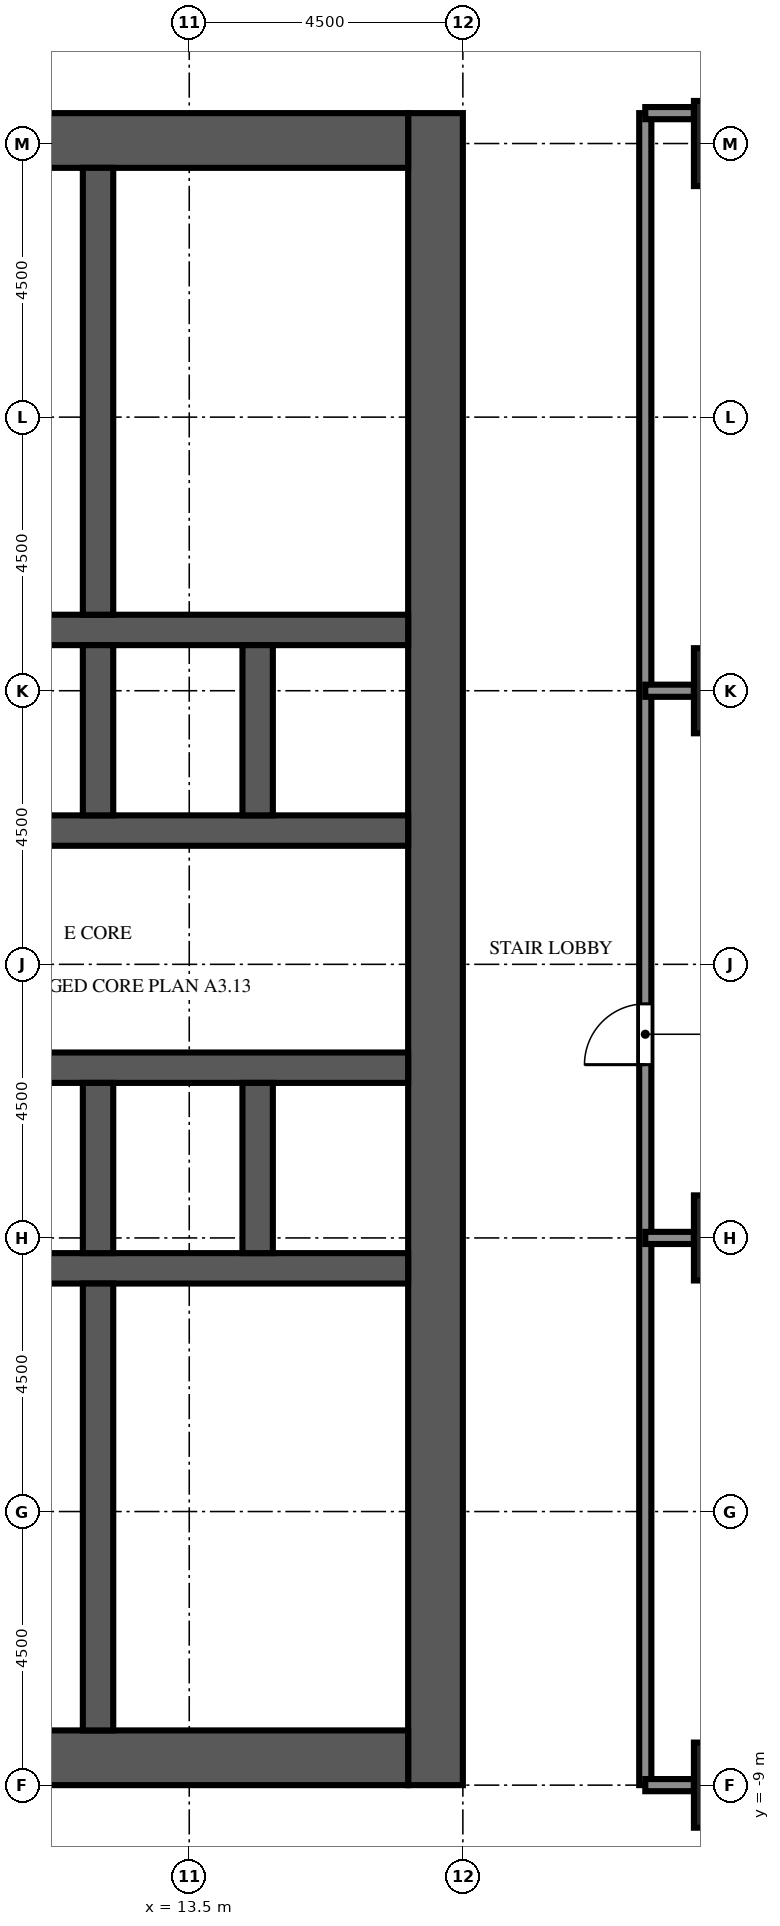
"""IFC4 building model, lengths in metres.
Left out: names, types, materials, properties, quantities, classifications, styles, units other than length and angle.
Written with IfcOpenShell. Run it as: python <this file> out.ifc"""

import sys

from ifc_helpers import new_model, si_unit, direction, frame, frame_2d, origin, origin_2d, place, context, subcontext, project, spatial, rectangle, extrude, element, fill, save


model = new_model("IFC4")
c1 = context("Model", 3, precision=1e-05, world=origin(), true_north=direction((0.0, 1.0)))
c2 = subcontext(c1, "Body", "Model", "MODEL_VIEW")
j1 = project(units=[si_unit("LENGTHUNIT", "METRE"), si_unit("PLANEANGLEUNIT", "RADIAN")], contexts=[c1])
p1 = place(None, origin())
s1 = spatial("IfcSite", under=j1, at=p1, CompositionType="ELEMENT")
p2 = place(p1, origin())
s2 = spatial("IfcBuilding", under=s1, at=p2, CompositionType="ELEMENT")
p3 = place(p2, frame((0.0, 0.0, 76.6)))
s3 = spatial("IfcBuildingStorey", under=s2, at=p3, CompositionType="ELEMENT", Elevation=76.6)
for number, where, z_axis, x_axis in (
    (1, (22.5, -9.0, 0.0), (0.0, 0.0, 1.0), (1.0, 0.0, 0.0)),
    (2, (22.5, 0.0, 0.0), (0.0, 0.0, 1.0), (1.0, 0.0, 0.0)),
    (3, (22.5, 9.0, 0.0), (0.0, 0.0, 1.0), (1.0, 0.0, 0.0)),
    (4, (22.5, 18.0, 0.0), (0.0, 0.0, 1.0), (1.0, 0.0, 0.0)),
):
    element("IfcColumn", number, at=place(p3, frame(where, z_axis=z_axis, x_axis=x_axis)), inside=s3, PredefinedType="COLUMN", context=c2, shape_type="SweptSolid", body=[
        extrude(rectangle(XDim=1.4, YDim=1.4, at=origin_2d()), origin(), (0.0, 0.0, 1.0), 5.4),
    ])
p4 = place(p3, frame((17.55, -9.0, 0.0), z_axis=(0.0, 0.0, 1.0), x_axis=(0.0, 1.0, 0.0)))
e5 = element("IfcWall", 5, at=p4, inside=s3, PredefinedType="SHEAR", context=c2, shape_type="SweptSolid", body=[
    extrude(rectangle(XDim=27.5, YDim=0.9, at=frame_2d((13.75, 0.0))), origin(), (0.0, 0.0, 1.0), 5.4),
])
p5 = place(p4, frame((12.55, 0.0, 0.0)))
e6 = element("IfcOpeningElement", 6, at=p5, cuts=e5, PredefinedType="OPENING", context=c2, shape_type="SweptSolid", body=[
    extrude(rectangle(XDim=2.4, YDim=2.4, at=frame_2d((1.2, 1.2))), frame((0.0, 0.46, 0.0), z_axis=(0.0, -1.0, 0.0), x_axis=(1.0, 0.0, 0.0)), (0.0, 0.0, 1.0), 0.92),
])
p6 = place(p4, frame((6.825, 0.0, 0.0)))
e7 = element("IfcOpeningElement", 7, at=p6, cuts=e5, PredefinedType="OPENING", context=c2, shape_type="SweptSolid", body=[
    extrude(rectangle(XDim=1.2, YDim=2.1, at=frame_2d((0.6, 1.05))), frame((0.0, 0.46, 0.0), z_axis=(0.0, -1.0, 0.0), x_axis=(1.0, 0.0, 0.0)), (0.0, 0.0, 1.0), 0.92),
])
p7 = place(p4, frame((19.475, 0.0, 0.0)))
e8 = element("IfcOpeningElement", 8, at=p7, cuts=e5, PredefinedType="OPENING", context=c2, shape_type="SweptSolid", body=[
    extrude(rectangle(XDim=1.2, YDim=2.1, at=frame_2d((0.6, 1.05))), frame((0.0, 0.46, 0.0), z_axis=(0.0, -1.0, 0.0), x_axis=(1.0, 0.0, 0.0)), (0.0, 0.0, 1.0), 0.92),
])
for number, where, z_axis, x_axis in (
    (9, (6.9, -8.55, 0.0), (0.0, 0.0, 1.0), (1.0, 0.0, 0.0)),
    (10, (6.9, 18.05, 0.0), (0.0, 0.0, 1.0), (1.0, 0.0, 0.0)),
):
    element("IfcWall", number, at=place(p3, frame(where, z_axis=z_axis, x_axis=x_axis)), inside=s3, PredefinedType="SHEAR", context=c2, shape_type="SweptSolid", body=[
        extrude(rectangle(XDim=10.2, YDim=0.9, at=frame_2d((5.1, 0.0))), origin(), (0.0, 0.0, 1.0), 5.4),
    ])
p8 = place(p3, frame((6.9, -0.5, 0.0), z_axis=(0.0, 0.0, 1.0), x_axis=(1.0, 0.0, 0.0)))
e11 = element("IfcWall", 11, at=p8, inside=s3, PredefinedType="SHEAR", context=c2, shape_type="SweptSolid", body=[
    extrude(rectangle(XDim=10.2, YDim=0.5, at=frame_2d((5.1, 0.0))), origin(), (0.0, 0.0, 1.0), 5.4),
])
p9 = place(p3, frame((6.9, 2.8, 0.0), z_axis=(0.0, 0.0, 1.0), x_axis=(1.0, 0.0, 0.0)))
e12 = element("IfcWall", 12, at=p9, inside=s3, PredefinedType="SHEAR", context=c2, shape_type="SweptSolid", body=[
    extrude(rectangle(XDim=10.2, YDim=0.5, at=frame_2d((5.1, 0.0))), origin(), (0.0, 0.0, 1.0), 5.4),
])
p10 = place(p9, frame((0.562, 0.0, 0.0)))
e13 = element("IfcOpeningElement", 13, at=p10, cuts=e12, PredefinedType="OPENING", context=c2, shape_type="SweptSolid", body=[
    extrude(rectangle(XDim=1.1, YDim=2.1, at=frame_2d((0.55, 1.05))), frame((0.0, 0.26, 0.0), z_axis=(0.0, -1.0, 0.0), x_axis=(1.0, 0.0, 0.0)), (0.0, 0.0, 1.0), 0.52),
])
p11 = place(p9, frame((3.238, 0.0, 0.0)))
e14 = element("IfcOpeningElement", 14, at=p11, cuts=e12, PredefinedType="OPENING", context=c2, shape_type="SweptSolid", body=[
    extrude(rectangle(XDim=1.1, YDim=2.1, at=frame_2d((0.55, 1.05))), frame((0.0, 0.26, 0.0), z_axis=(0.0, -1.0, 0.0), x_axis=(1.0, 0.0, 0.0)), (0.0, 0.0, 1.0), 0.52),
])
p12 = place(p9, frame((8.538, 0.0, 0.0)))
e15 = element("IfcOpeningElement", 15, at=p12, cuts=e12, PredefinedType="OPENING", context=c2, shape_type="SweptSolid", body=[
    extrude(rectangle(XDim=1.1, YDim=2.1, at=frame_2d((0.55, 1.05))), frame((0.0, 0.26, 0.0), z_axis=(0.0, -1.0, 0.0), x_axis=(1.0, 0.0, 0.0)), (0.0, 0.0, 1.0), 0.52),
])
p13 = place(p3, frame((6.9, 6.7, 0.0), z_axis=(0.0, 0.0, 1.0), x_axis=(1.0, 0.0, 0.0)))
e16 = element("IfcWall", 16, at=p13, inside=s3, PredefinedType="SHEAR", context=c2, shape_type="SweptSolid", body=[
    extrude(rectangle(XDim=10.2, YDim=0.5, at=frame_2d((5.1, 0.0))), origin(), (0.0, 0.0, 1.0), 5.4),
])
p14 = place(p13, frame((0.562, 0.0, 0.0)))
e17 = element("IfcOpeningElement", 17, at=p14, cuts=e16, PredefinedType="OPENING", context=c2, shape_type="SweptSolid", body=[
    extrude(rectangle(XDim=1.1, YDim=2.1, at=frame_2d((0.55, 1.05))), frame((0.0, 0.26, 0.0), z_axis=(0.0, -1.0, 0.0), x_axis=(1.0, 0.0, 0.0)), (0.0, 0.0, 1.0), 0.52),
])
p15 = place(p13, frame((3.288, 0.0, 0.0)))
e18 = element("IfcOpeningElement", 18, at=p15, cuts=e16, PredefinedType="OPENING", context=c2, shape_type="SweptSolid", body=[
    extrude(rectangle(XDim=1.0, YDim=2.1, at=frame_2d((0.5, 1.05))), frame((0.0, 0.26, 0.0), z_axis=(0.0, -1.0, 0.0), x_axis=(1.0, 0.0, 0.0)), (0.0, 0.0, 1.0), 0.52),
])
p16 = place(p13, frame((5.913, 0.0, 0.0)))
e19 = element("IfcOpeningElement", 19, at=p16, cuts=e16, PredefinedType="OPENING", context=c2, shape_type="SweptSolid", body=[
    extrude(rectangle(XDim=1.0, YDim=2.1, at=frame_2d((0.5, 1.05))), frame((0.0, 0.26, 0.0), z_axis=(0.0, -1.0, 0.0), x_axis=(1.0, 0.0, 0.0)), (0.0, 0.0, 1.0), 0.52),
])
p17 = place(p13, frame((8.587, 0.0, 0.0)))
e20 = element("IfcOpeningElement", 20, at=p17, cuts=e16, PredefinedType="OPENING", context=c2, shape_type="SweptSolid", body=[
    extrude(rectangle(XDim=1.0, YDim=2.1, at=frame_2d((0.5, 1.05))), frame((0.0, 0.26, 0.0), z_axis=(0.0, -1.0, 0.0), x_axis=(1.0, 0.0, 0.0)), (0.0, 0.0, 1.0), 0.52),
])
p18 = place(p3, frame((6.9, 10.0, 0.0), z_axis=(0.0, 0.0, 1.0), x_axis=(1.0, 0.0, 0.0)))
e21 = element("IfcWall", 21, at=p18, inside=s3, PredefinedType="SHEAR", context=c2, shape_type="SweptSolid", body=[
    extrude(rectangle(XDim=10.2, YDim=0.5, at=frame_2d((5.1, 0.0))), origin(), (0.0, 0.0, 1.0), 5.4),
])
for number, where, z_axis, x_axis in (
    (22, (12.0, -0.25, 0.0), (0.0, 0.0, 1.0), (0.0, 1.0, 0.0)),
    (23, (12.0, 6.95, 0.0), (0.0, 0.0, 1.0), (0.0, 1.0, 0.0)),
    (24, (14.625, -0.25, 0.0), (0.0, 0.0, 1.0), (0.0, 1.0, 0.0)),
    (25, (14.625, 6.95, 0.0), (0.0, 0.0, 1.0), (0.0, 1.0, 0.0)),
):
    element("IfcWall", number, at=place(p3, frame(where, z_axis=z_axis, x_axis=x_axis)), inside=s3, PredefinedType="SHEAR", context=c2, shape_type="SweptSolid", body=[
        extrude(rectangle(XDim=2.8, YDim=0.5, at=frame_2d((1.4, 0.0))), origin(), (0.0, 0.0, 1.0), 5.4),
    ])
for number, where, z_axis, x_axis in (
    (26, (12.0, -8.1, 0.0), (0.0, 0.0, 1.0), (0.0, 1.0, 0.0)),
    (27, (12.0, 10.25, 0.0), (0.0, 0.0, 1.0), (0.0, 1.0, 0.0)),
):
    element("IfcWall", number, at=place(p3, frame(where, z_axis=z_axis, x_axis=x_axis)), inside=s3, PredefinedType="SHEAR", context=c2, shape_type="SweptSolid", body=[
        extrude(rectangle(XDim=7.35, YDim=0.5, at=frame_2d((3.675, 0.0))), origin(), (0.0, 0.0, 1.0), 5.4),
    ])
for number, where, z_axis, x_axis in (
    (28, (8.4, -5.16, 0.0), (0.0, 0.0, 1.0), (1.0, 0.0, 0.0)),
    (29, (8.4, -2.955, 0.0), (0.0, 0.0, 1.0), (1.0, 0.0, 0.0)),
):
    element("IfcWall", number, at=place(p3, frame(where, z_axis=z_axis, x_axis=x_axis)), inside=s3, PredefinedType="PARTITIONING", context=c2, shape_type="SweptSolid", body=[
        extrude(rectangle(XDim=3.35, YDim=0.1, at=frame_2d((1.675, 0.0))), origin(), (0.0, 0.0, 1.0), 4.95),
    ])
for number, where, z_axis, x_axis in (
    (30, (6.9, 11.72, 0.0), (0.0, 0.0, 1.0), (1.0, 0.0, 0.0)),
    (31, (6.9, 13.558, 0.0), (0.0, 0.0, 1.0), (1.0, 0.0, 0.0)),
    (32, (6.9, 15.762, 0.0), (0.0, 0.0, 1.0), (1.0, 0.0, 0.0)),
):
    element("IfcWall", number, at=place(p3, frame(where, z_axis=z_axis, x_axis=x_axis)), inside=s3, PredefinedType="PARTITIONING", context=c2, shape_type="SweptSolid", body=[
        extrude(rectangle(XDim=4.85, YDim=0.1, at=frame_2d((2.425, 0.0))), origin(), (0.0, 0.0, 1.0), 4.95),
    ])
p19 = place(p3, frame((21.0, 18.5, 0.0), z_axis=(0.0, 0.0, 1.0), x_axis=(0.0, -1.0, 0.0)))
e33 = element("IfcWall", 33, at=p19, inside=s3, PredefinedType="PARTITIONING", context=c2, shape_type="SweptSolid", body=[
    extrude(rectangle(XDim=27.5, YDim=0.2, at=frame_2d((13.75, 0.0))), origin(), (0.0, 0.0, 1.0), 4.95),
])
p20 = place(p19, frame((14.65, 0.0, 0.0)))
e34 = element("IfcOpeningElement", 34, at=p20, cuts=e33, PredefinedType="OPENING", context=c2, shape_type="SweptSolid", body=[
    extrude(rectangle(XDim=1.0, YDim=2.1, at=frame_2d((0.5, 1.05))), frame((0.0, 0.11, 0.0), z_axis=(0.0, -1.0, 0.0), x_axis=(1.0, 0.0, 0.0)), (0.0, 0.0, 1.0), 0.22),
])
for number, where, z_axis, x_axis in (
    (35, (21.0, -9.0, 0.0), (0.0, 0.0, 1.0), (1.0, 0.0, 0.0)),
    (36, (21.0, 0.0, 0.0), (0.0, 0.0, 1.0), (1.0, 0.0, 0.0)),
    (37, (21.0, 9.0, 0.0), (0.0, 0.0, 1.0), (1.0, 0.0, 0.0)),
    (38, (21.0, 18.5, 0.0), (0.0, 0.0, 1.0), (1.0, 0.0, 0.0)),
):
    element("IfcWall", number, at=place(p3, frame(where, z_axis=z_axis, x_axis=x_axis)), inside=s3, PredefinedType="PARTITIONING", context=c2, shape_type="SweptSolid", body=[
        extrude(rectangle(XDim=0.8, YDim=0.2, at=frame_2d((0.4, 0.0))), origin(), (0.0, 0.0, 1.0), 4.95),
    ])
p21 = place(p12, origin())
e39 = element("IfcDoor", 39, at=p21, inside=s3, OperationType="DOUBLE_DOOR_SLIDING", PredefinedType="DOOR", context=c2, shape_type="SweptSolid", body=[
    extrude(rectangle(XDim=1.1, YDim=2.1, at=frame_2d((0.55, 1.05))), frame((0.0, 0.025, 0.0), z_axis=(0.0, -1.0, 0.0), x_axis=(1.0, 0.0, 0.0)), (0.0, 0.0, 1.0), 0.05),
])
fill(e15, e39)
p22 = place(p5, origin())
e40 = element("IfcDoor", 40, at=p22, inside=s3, OperationType="DOUBLE_DOOR_DOUBLE_SWING", PredefinedType="DOOR", context=c2, shape_type="SweptSolid", body=[
    extrude(rectangle(XDim=2.4, YDim=2.4, at=frame_2d((1.2, 1.2))), frame((0.0, 0.025, 0.0), z_axis=(0.0, -1.0, 0.0), x_axis=(1.0, 0.0, 0.0)), (0.0, 0.0, 1.0), 0.05),
])
fill(e6, e40)
p23 = place(p6, frame((1.2, 0.0, 0.0), z_axis=(0.0, 0.0, 1.0), x_axis=(-1.0, 0.0, 0.0)))
e41 = element("IfcDoor", 41, at=p23, inside=s3, OperationType="SINGLE_SWING_LEFT", PredefinedType="DOOR", context=c2, shape_type="SweptSolid", body=[
    extrude(rectangle(XDim=1.2, YDim=2.1, at=frame_2d((0.6, 1.05))), frame((0.0, 0.025, 0.0), z_axis=(0.0, -1.0, 0.0), x_axis=(1.0, 0.0, 0.0)), (0.0, 0.0, 1.0), 0.05),
])
fill(e7, e41)
p24 = place(p7, frame((1.2, 0.0, 0.0), z_axis=(0.0, 0.0, 1.0), x_axis=(-1.0, 0.0, 0.0)))
e42 = element("IfcDoor", 42, at=p24, inside=s3, OperationType="SINGLE_SWING_LEFT", PredefinedType="DOOR", context=c2, shape_type="SweptSolid", body=[
    extrude(rectangle(XDim=1.2, YDim=2.1, at=frame_2d((0.6, 1.05))), frame((0.0, 0.025, 0.0), z_axis=(0.0, -1.0, 0.0), x_axis=(1.0, 0.0, 0.0)), (0.0, 0.0, 1.0), 0.05),
])
fill(e8, e42)
p25 = place(p16, origin())
e43 = element("IfcDoor", 43, at=p25, inside=s3, OperationType="SINGLE_SWING_LEFT", PredefinedType="DOOR", context=c2, shape_type="SweptSolid", body=[
    extrude(rectangle(XDim=1.0, YDim=2.1, at=frame_2d((0.5, 1.05))), frame((0.0, 0.025, 0.0), z_axis=(0.0, -1.0, 0.0), x_axis=(1.0, 0.0, 0.0)), (0.0, 0.0, 1.0), 0.05),
])
fill(e19, e43)
p26 = place(p17, origin())
e44 = element("IfcDoor", 44, at=p26, inside=s3, OperationType="SINGLE_SWING_RIGHT", PredefinedType="DOOR", context=c2, shape_type="SweptSolid", body=[
    extrude(rectangle(XDim=1.0, YDim=2.1, at=frame_2d((0.5, 1.05))), frame((0.0, 0.025, 0.0), z_axis=(0.0, -1.0, 0.0), x_axis=(1.0, 0.0, 0.0)), (0.0, 0.0, 1.0), 0.05),
])
fill(e20, e44)
p27 = place(p20, origin())
e45 = element("IfcDoor", 45, at=p27, inside=s3, OperationType="SINGLE_SWING_RIGHT", PredefinedType="DOOR", context=c2, shape_type="SweptSolid", body=[
    extrude(rectangle(XDim=1.0, YDim=2.1, at=frame_2d((0.5, 1.05))), frame((0.0, 0.025, 0.0), z_axis=(0.0, -1.0, 0.0), x_axis=(1.0, 0.0, 0.0)), (0.0, 0.0, 1.0), 0.05),
])
fill(e34, e45)
save(model, sys.argv[1])
